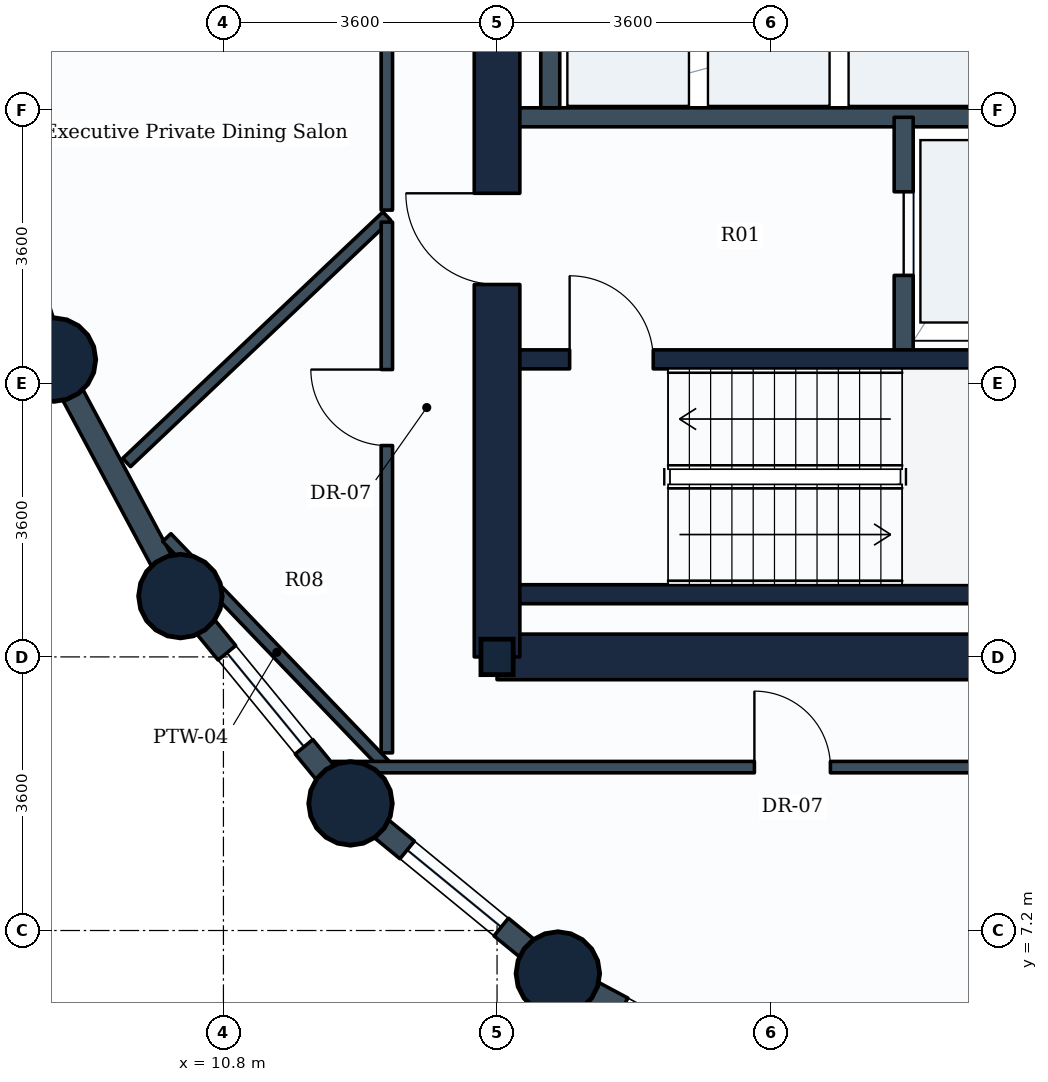
"""IFC4 building model, lengths in metres.
Left out: names, types, materials, properties, quantities, classifications, styles, units other than length and angle.
Written with IfcOpenShell. Run it as: python <this file> out.ifc"""

import sys

from ifc_helpers import new_model, si_unit, direction, frame, frame_2d, origin, origin_2d, place, context, subcontext, project, spatial, rectangle, circle, i_section, extrude, element, fill, save


model = new_model("IFC4")
c1 = context("Model", 3, precision=1e-05, world=origin(), true_north=direction((0.0, 1.0)))
c2 = subcontext(c1, "Body", "Model", "MODEL_VIEW")
j1 = project(units=[si_unit("LENGTHUNIT", "METRE"), si_unit("PLANEANGLEUNIT", "RADIAN")], contexts=[c1])
p1 = place(None, origin())
s1 = spatial("IfcSite", under=j1, at=p1, CompositionType="ELEMENT")
p2 = place(p1, origin())
s2 = spatial("IfcBuilding", under=s1, at=p2, CompositionType="ELEMENT")
p3 = place(p2, frame((0.0, 0.0, 70.8)))
s3 = spatial("IfcBuildingStorey", under=s2, at=p3, CompositionType="ELEMENT", Elevation=70.8)
for number, where, z_axis, x_axis in (
    (1, (8.57, 14.712, 0.0), (0.0, 0.0, 1.0), (1.0, 0.0, 0.0)),
    (2, (10.234, 11.6, 0.0), (0.0, 0.0, 1.0), (1.0, 0.0, 0.0)),
    (3, (12.472, 8.872, 0.0), (0.0, 0.0, 1.0), (1.0, 0.0, 0.0)),
):
    element("IfcColumn", number, at=place(p3, frame(where, z_axis=z_axis, x_axis=x_axis)), inside=s3, PredefinedType="COLUMN", context=c2, shape_type="SweptSolid", body=[
        extrude(circle(Radius=0.55, at=origin_2d()), origin(), (0.0, 0.0, 1.0), 3.9),
    ])
p4 = place(p3, frame((14.4, 10.8, 0.0), z_axis=(0.0, 0.0, 1.0), x_axis=(1.0, 0.0, 0.0)))
e4 = element("IfcColumn", 4, at=p4, inside=s3, PredefinedType="COLUMN", context=c2, shape_type="SweptSolid", body=[
    extrude(i_section(OverallWidth=0.424, OverallDepth=0.467, WebThickness=0.033, FlangeThickness=0.053, FilletRadius=0.015, at=origin_2d()), origin(), (0.0, 0.0, 1.0), 3.9),
])
p5 = place(p3, frame((15.2, 6.634, 0.0), z_axis=(0.0, 0.0, 1.0), x_axis=(1.0, 0.0, 0.0)))
e5 = element("IfcColumn", 5, at=p5, inside=s3, PredefinedType="COLUMN", context=c2, shape_type="SweptSolid", body=[
    extrude(circle(Radius=0.55, at=origin_2d()), origin(), (0.0, 0.0, 1.0), 3.9),
])
p6 = place(p3, frame((8.57, 14.712, 0.0), z_axis=(0.0, 0.0, 1.0), x_axis=(-0.290305086481, 0.956934144423, 0.0)))
e6 = element("IfcWall", 6, at=p6, inside=s3, PredefinedType="STANDARD", context=c2, shape_type="SweptSolid", body=[
    extrude(rectangle(XDim=3.528, YDim=0.3, at=frame_2d((1.764, 0.0))), origin(), (0.0, 0.0, 1.0), 2.93),
])
p7 = place(p6, frame((0.964, 0.0, 0.85)))
e7 = element("IfcOpeningElement", 7, at=p7, cuts=e6, PredefinedType="OPENING", context=c2, shape_type="SweptSolid", body=[
    extrude(rectangle(XDim=1.6, YDim=1.35, at=frame_2d((0.8, 0.675))), frame((0.0, 0.16, 0.0), z_axis=(0.0, -1.0, 0.0), x_axis=(1.0, 0.0, 0.0)), (0.0, 0.0, 1.0), 0.32),
])
p8 = place(p3, frame((10.234, 11.6, 0.0), z_axis=(0.0, 0.0, 1.0), x_axis=(-0.47151087309, 0.881860247748, 0.0)))
e8 = element("IfcWall", 8, at=p8, inside=s3, PredefinedType="STANDARD", context=c2, shape_type="SweptSolid", body=[
    extrude(rectangle(XDim=3.529, YDim=0.3, at=frame_2d((1.764, 0.0))), origin(), (0.0, 0.0, 1.0), 2.93),
])
p9 = place(p3, frame((12.472, 8.872, 0.0), z_axis=(0.0, 0.0, 1.0), x_axis=(-0.634258295121, 0.773121216285, 0.0)))
e9 = element("IfcWall", 9, at=p9, inside=s3, PredefinedType="STANDARD", context=c2, shape_type="SweptSolid", body=[
    extrude(rectangle(XDim=3.529, YDim=0.3, at=frame_2d((1.764, 0.0))), origin(), (0.0, 0.0, 1.0), 2.93),
])
p10 = place(p9, frame((0.964, 0.0, 0.85)))
e10 = element("IfcOpeningElement", 10, at=p10, cuts=e9, PredefinedType="OPENING", context=c2, shape_type="SweptSolid", body=[
    extrude(rectangle(XDim=1.6, YDim=1.35, at=frame_2d((0.8, 0.675))), frame((0.0, 0.16, 0.0), z_axis=(0.0, -1.0, 0.0), x_axis=(1.0, 0.0, 0.0)), (0.0, 0.0, 1.0), 0.32),
])
p11 = place(p3, frame((15.2, 6.634, 0.0), z_axis=(0.0, 0.0, 1.0), x_axis=(-0.773121216285, 0.634258295121, 0.0)))
e11 = element("IfcWall", 11, at=p11, inside=s3, PredefinedType="STANDARD", context=c2, shape_type="SweptSolid", body=[
    extrude(rectangle(XDim=3.529, YDim=0.3, at=frame_2d((1.764, 0.0))), origin(), (0.0, 0.0, 1.0), 2.93),
])
p12 = place(p11, frame((0.964, 0.0, 0.85)))
e12 = element("IfcOpeningElement", 12, at=p12, cuts=e11, PredefinedType="OPENING", context=c2, shape_type="SweptSolid", body=[
    extrude(rectangle(XDim=1.6, YDim=1.35, at=frame_2d((0.8, 0.675))), frame((0.0, 0.16, 0.0), z_axis=(0.0, -1.0, 0.0), x_axis=(1.0, 0.0, 0.0)), (0.0, 0.0, 1.0), 0.32),
])
p13 = place(p3, frame((18.312, 4.97, 0.0), z_axis=(0.0, 0.0, 1.0), x_axis=(-0.881846862014, 0.471535907389, 0.0)))
e13 = element("IfcWall", 13, at=p13, inside=s3, PredefinedType="STANDARD", context=c2, shape_type="SweptSolid", body=[
    extrude(rectangle(XDim=3.529, YDim=0.3, at=frame_2d((1.765, 0.0))), origin(), (0.0, 0.0, 1.0), 2.93),
])
p14 = place(p13, frame((0.964, 0.0, 0.85)))
e14 = element("IfcOpeningElement", 14, at=p14, cuts=e13, PredefinedType="OPENING", context=c2, shape_type="SweptSolid", body=[
    extrude(rectangle(XDim=1.6, YDim=1.35, at=frame_2d((0.8, 0.675))), frame((0.0, 0.16, 0.0), z_axis=(0.0, -1.0, 0.0), x_axis=(1.0, 0.0, 0.0)), (0.0, 0.0, 1.0), 0.32),
])
p15 = place(p3, frame((14.4, 10.8, 0.0), z_axis=(0.0, 0.0, 1.0), x_axis=(1.0, 0.0, 0.0)))
e15 = element("IfcWall", 15, at=p15, inside=s3, PredefinedType="SHEAR", context=c2, shape_type="SweptSolid", body=[
    extrude(rectangle(XDim=18.0, YDim=0.6, at=frame_2d((9.0, 0.0))), origin(), (0.0, 0.0, 1.0), 3.58),
])
p16 = place(p3, frame((14.4, 10.8, 0.0), z_axis=(0.0, 0.0, 1.0), x_axis=(0.0, 1.0, 0.0)))
e16 = element("IfcWall", 16, at=p16, inside=s3, PredefinedType="SHEAR", context=c2, shape_type="SweptSolid", body=[
    extrude(rectangle(XDim=14.4, YDim=0.6, at=frame_2d((7.2, 0.0))), origin(), (0.0, 0.0, 1.0), 3.58),
])
p17 = place(p16, frame((11.05, 0.0, 0.0)))
e17 = element("IfcOpeningElement", 17, at=p17, cuts=e16, PredefinedType="OPENING", context=c2, shape_type="SweptSolid", body=[
    extrude(rectangle(XDim=1.1, YDim=2.1, at=frame_2d((0.55, 1.05))), frame((0.0, 0.31, 0.0), z_axis=(0.0, -1.0, 0.0), x_axis=(1.0, 0.0, 0.0)), (0.0, 0.0, 1.0), 0.62),
])
p18 = place(p16, frame((4.9, 0.0, 0.0)))
e18 = element("IfcOpeningElement", 18, at=p18, cuts=e16, PredefinedType="OPENING", context=c2, shape_type="SweptSolid", body=[
    extrude(rectangle(XDim=1.2, YDim=2.1, at=frame_2d((0.6, 1.05))), frame((0.0, 0.31, 0.0), z_axis=(0.0, -1.0, 0.0), x_axis=(1.0, 0.0, 0.0)), (0.0, 0.0, 1.0), 0.62),
])
p19 = place(p3, frame((14.7, 11.625, 0.0), z_axis=(0.0, 0.0, 1.0), x_axis=(1.0, 0.0, 0.0)))
e19 = element("IfcWall", 19, at=p19, inside=s3, PredefinedType="SHEAR", context=c2, shape_type="SweptSolid", body=[
    extrude(rectangle(XDim=8.65, YDim=0.25, at=frame_2d((4.325, 0.0))), origin(), (0.0, 0.0, 1.0), 3.58),
])
p20 = place(p3, frame((14.7, 14.715, 0.0), z_axis=(0.0, 0.0, 1.0), x_axis=(1.0, 0.0, 0.0)))
e20 = element("IfcWall", 20, at=p20, inside=s3, PredefinedType="SHEAR", context=c2, shape_type="SweptSolid", body=[
    extrude(rectangle(XDim=8.65, YDim=0.25, at=frame_2d((4.325, 0.0))), origin(), (0.0, 0.0, 1.0), 3.58),
])
p21 = place(p20, frame((0.655, 0.0, 0.0)))
e21 = element("IfcOpeningElement", 21, at=p21, cuts=e20, PredefinedType="OPENING", context=c2, shape_type="SweptSolid", body=[
    extrude(rectangle(XDim=1.1, YDim=2.1, at=frame_2d((0.55, 1.05))), frame((0.0, 0.135, 0.0), z_axis=(0.0, -1.0, 0.0), x_axis=(1.0, 0.0, 0.0)), (0.0, 0.0, 1.0), 0.27),
])
p22 = place(p3, frame((14.65, 17.9, 0.0), z_axis=(0.0, 0.0, 1.0), x_axis=(1.0, 0.0, 0.0)))
e22 = element("IfcWall", 22, at=p22, inside=s3, PredefinedType="PARTITIONING", context=c2, shape_type="SweptSolid", body=[
    extrude(rectangle(XDim=7.15, YDim=0.25, at=frame_2d((3.575, 0.0))), origin(), (0.0, 0.0, 1.0), 3.565),
])
p23 = place(p3, frame((19.75, 14.84, 0.0), z_axis=(0.0, 0.0, 1.0), x_axis=(0.0, 1.0, 0.0)))
e23 = element("IfcWall", 23, at=p23, inside=s3, PredefinedType="PARTITIONING", context=c2, shape_type="SweptSolid", body=[
    extrude(rectangle(XDim=3.06, YDim=0.25, at=frame_2d((1.53, 0.0))), origin(), (0.0, 0.0, 1.0), 3.565),
])
p24 = place(p23, frame((0.98, 0.0, 0.0)))
e24 = element("IfcOpeningElement", 24, at=p24, cuts=e23, PredefinedType="OPENING", context=c2, shape_type="SweptSolid", body=[
    extrude(rectangle(XDim=1.1, YDim=2.1, at=frame_2d((0.55, 1.05))), frame((0.0, 0.135, 0.0), z_axis=(0.0, -1.0, 0.0), x_axis=(1.0, 0.0, 0.0)), (0.0, 0.0, 1.0), 0.27),
])
p25 = place(p3, frame((15.1, 18.025, 0.0), z_axis=(0.0, 0.0, 1.0), x_axis=(0.0, 1.0, 0.0)))
e25 = element("IfcWall", 25, at=p25, inside=s3, PredefinedType="PARTITIONING", context=c2, shape_type="SweptSolid", body=[
    extrude(rectangle(XDim=1.975, YDim=0.25, at=frame_2d((0.988, 0.0))), origin(), (0.0, 0.0, 1.0), 3.565),
])
p26 = place(p3, frame((12.95, 9.35, 0.0), z_axis=(0.0, 0.0, 1.0), x_axis=(-0.692039701287, 0.721859440503, 0.0)))
e26 = element("IfcWall", 26, at=p26, inside=s3, PredefinedType="PARTITIONING", context=c2, shape_type="SweptSolid", body=[
    extrude(rectangle(XDim=4.184, YDim=0.15, at=frame_2d((2.092, 0.0))), origin(), (0.0, 0.0, 1.0), 2.93),
])
p27 = place(p3, frame((12.95, 16.6, 0.0), z_axis=(0.0, 0.0, 1.0), x_axis=(-0.726056084079, -0.687635486847, 0.0)))
e27 = element("IfcWall", 27, at=p27, inside=s3, PredefinedType="PARTITIONING", context=c2, shape_type="SweptSolid", body=[
    extrude(rectangle(XDim=4.715, YDim=0.15, at=frame_2d((2.357, 0.0))), origin(), (0.0, 0.0, 1.0), 2.93),
])
p28 = place(p3, frame((12.95, 16.679, 0.0), z_axis=(0.0, 0.0, 1.0), x_axis=(0.0, 1.0, 0.0)))
e28 = element("IfcWall", 28, at=p28, inside=s3, PredefinedType="PARTITIONING", context=c2, shape_type="SweptSolid", body=[
    extrude(rectangle(XDim=8.442, YDim=0.15, at=frame_2d((4.221, 0.0))), origin(), (0.0, 0.0, 1.0), 3.01),
])
p29 = place(p28, frame((3.721, 0.0, 0.0)))
e29 = element("IfcOpeningElement", 29, at=p29, cuts=e28, PredefinedType="OPENING", context=c2, shape_type="SweptSolid", body=[
    extrude(rectangle(XDim=1.0, YDim=2.1, at=frame_2d((0.5, 1.05))), frame((0.0, 0.085, 0.0), z_axis=(0.0, -1.0, 0.0), x_axis=(1.0, 0.0, 0.0)), (0.0, 0.0, 1.0), 0.17),
])
p30 = place(p3, frame((12.95, 9.538, 0.0), z_axis=(0.0, 0.0, 1.0), x_axis=(0.0, 1.0, 0.0)))
e30 = element("IfcWall", 30, at=p30, inside=s3, PredefinedType="PARTITIONING", context=c2, shape_type="SweptSolid", body=[
    extrude(rectangle(XDim=6.983, YDim=0.15, at=frame_2d((3.492, 0.0))), origin(), (0.0, 0.0, 1.0), 2.97),
])
p31 = place(p30, frame((4.043, 0.0, 0.0)))
e31 = element("IfcOpeningElement", 31, at=p31, cuts=e30, PredefinedType="OPENING", context=c2, shape_type="SweptSolid", body=[
    extrude(rectangle(XDim=1.0, YDim=2.1, at=frame_2d((0.5, 1.05))), frame((0.0, 0.085, 0.0), z_axis=(0.0, -1.0, 0.0), x_axis=(1.0, 0.0, 0.0)), (0.0, 0.0, 1.0), 0.17),
])
p32 = place(p3, frame((12.234, 9.35, 0.0), z_axis=(0.0, 0.0, 1.0), x_axis=(1.0, 0.0, 0.0)))
e32 = element("IfcWall", 32, at=p32, inside=s3, PredefinedType="PARTITIONING", context=c2, shape_type="SweptSolid", body=[
    extrude(rectangle(XDim=16.487, YDim=0.15, at=frame_2d((8.244, 0.0))), origin(), (0.0, 0.0, 1.0), 2.93),
])
p33 = place(p32, frame((5.552, 0.0, 0.0)))
e33 = element("IfcOpeningElement", 33, at=p33, cuts=e32, PredefinedType="OPENING", context=c2, shape_type="SweptSolid", body=[
    extrude(rectangle(XDim=1.0, YDim=2.1, at=frame_2d((0.5, 1.05))), frame((0.0, 0.085, 0.0), z_axis=(0.0, -1.0, 0.0), x_axis=(1.0, 0.0, 0.0)), (0.0, 0.0, 1.0), 0.17),
])
p34 = place(p10, origin())
e34 = element("IfcWindow", 34, at=p34, inside=s3, PartitioningType="SINGLE_PANEL", PredefinedType="WINDOW", context=c2, shape_type="SweptSolid", body=[
    extrude(rectangle(XDim=1.6, YDim=1.35, at=frame_2d((0.8, 0.675))), frame((0.0, 0.03, 0.0), z_axis=(0.0, -1.0, 0.0), x_axis=(1.0, 0.0, 0.0)), (0.0, 0.0, 1.0), 0.06),
])
fill(e10, e34)
p35 = place(p12, origin())
e35 = element("IfcWindow", 35, at=p35, inside=s3, PartitioningType="SINGLE_PANEL", PredefinedType="WINDOW", context=c2, shape_type="SweptSolid", body=[
    extrude(rectangle(XDim=1.6, YDim=1.35, at=frame_2d((0.8, 0.675))), frame((0.0, 0.03, 0.0), z_axis=(0.0, -1.0, 0.0), x_axis=(1.0, 0.0, 0.0)), (0.0, 0.0, 1.0), 0.06),
])
fill(e12, e35)
p36 = place(p21, origin())
e36 = element("IfcDoor", 36, at=p36, inside=s3, OperationType="SINGLE_SWING_LEFT", PredefinedType="DOOR", context=c2, shape_type="SweptSolid", body=[
    extrude(rectangle(XDim=1.1, YDim=2.1, at=frame_2d((0.55, 1.05))), frame((0.0, 0.025, 0.0), z_axis=(0.0, -1.0, 0.0), x_axis=(1.0, 0.0, 0.0)), (0.0, 0.0, 1.0), 0.05),
])
fill(e21, e36)
p37 = place(p24, origin())
e37 = element("IfcDoor", 37, at=p37, inside=s3, OperationType="SLIDING_TO_LEFT", PredefinedType="DOOR", context=c2, shape_type="SweptSolid", body=[
    extrude(rectangle(XDim=1.1, YDim=2.1, at=frame_2d((0.55, 1.05))), frame((0.0, 0.025, 0.0), z_axis=(0.0, -1.0, 0.0), x_axis=(1.0, 0.0, 0.0)), (0.0, 0.0, 1.0), 0.05),
])
fill(e24, e37)
p38 = place(p18, origin())
e38 = element("IfcDoor", 38, at=p38, inside=s3, OperationType="SINGLE_SWING_RIGHT", PredefinedType="DOOR", context=c2, shape_type="SweptSolid", body=[
    extrude(rectangle(XDim=1.2, YDim=2.1, at=frame_2d((0.6, 1.05))), frame((0.0, 0.025, 0.0), z_axis=(0.0, -1.0, 0.0), x_axis=(1.0, 0.0, 0.0)), (0.0, 0.0, 1.0), 0.05),
])
fill(e18, e38)
p39 = place(p31, origin())
e39 = element("IfcDoor", 39, at=p39, inside=s3, OperationType="SINGLE_SWING_RIGHT", PredefinedType="DOOR", context=c2, shape_type="SweptSolid", body=[
    extrude(rectangle(XDim=1.0, YDim=2.1, at=frame_2d((0.5, 1.05))), frame((0.0, 0.025, 0.0), z_axis=(0.0, -1.0, 0.0), x_axis=(1.0, 0.0, 0.0)), (0.0, 0.0, 1.0), 0.05),
])
fill(e31, e39)
p40 = place(p33, origin())
e40 = element("IfcDoor", 40, at=p40, inside=s3, OperationType="SINGLE_SWING_LEFT", PredefinedType="DOOR", context=c2, shape_type="SweptSolid", body=[
    extrude(rectangle(XDim=1.0, YDim=2.1, at=frame_2d((0.5, 1.05))), frame((0.0, 0.025, 0.0), z_axis=(0.0, -1.0, 0.0), x_axis=(1.0, 0.0, 0.0)), (0.0, 0.0, 1.0), 0.05),
])
fill(e33, e40)
save(model, sys.argv[1])
